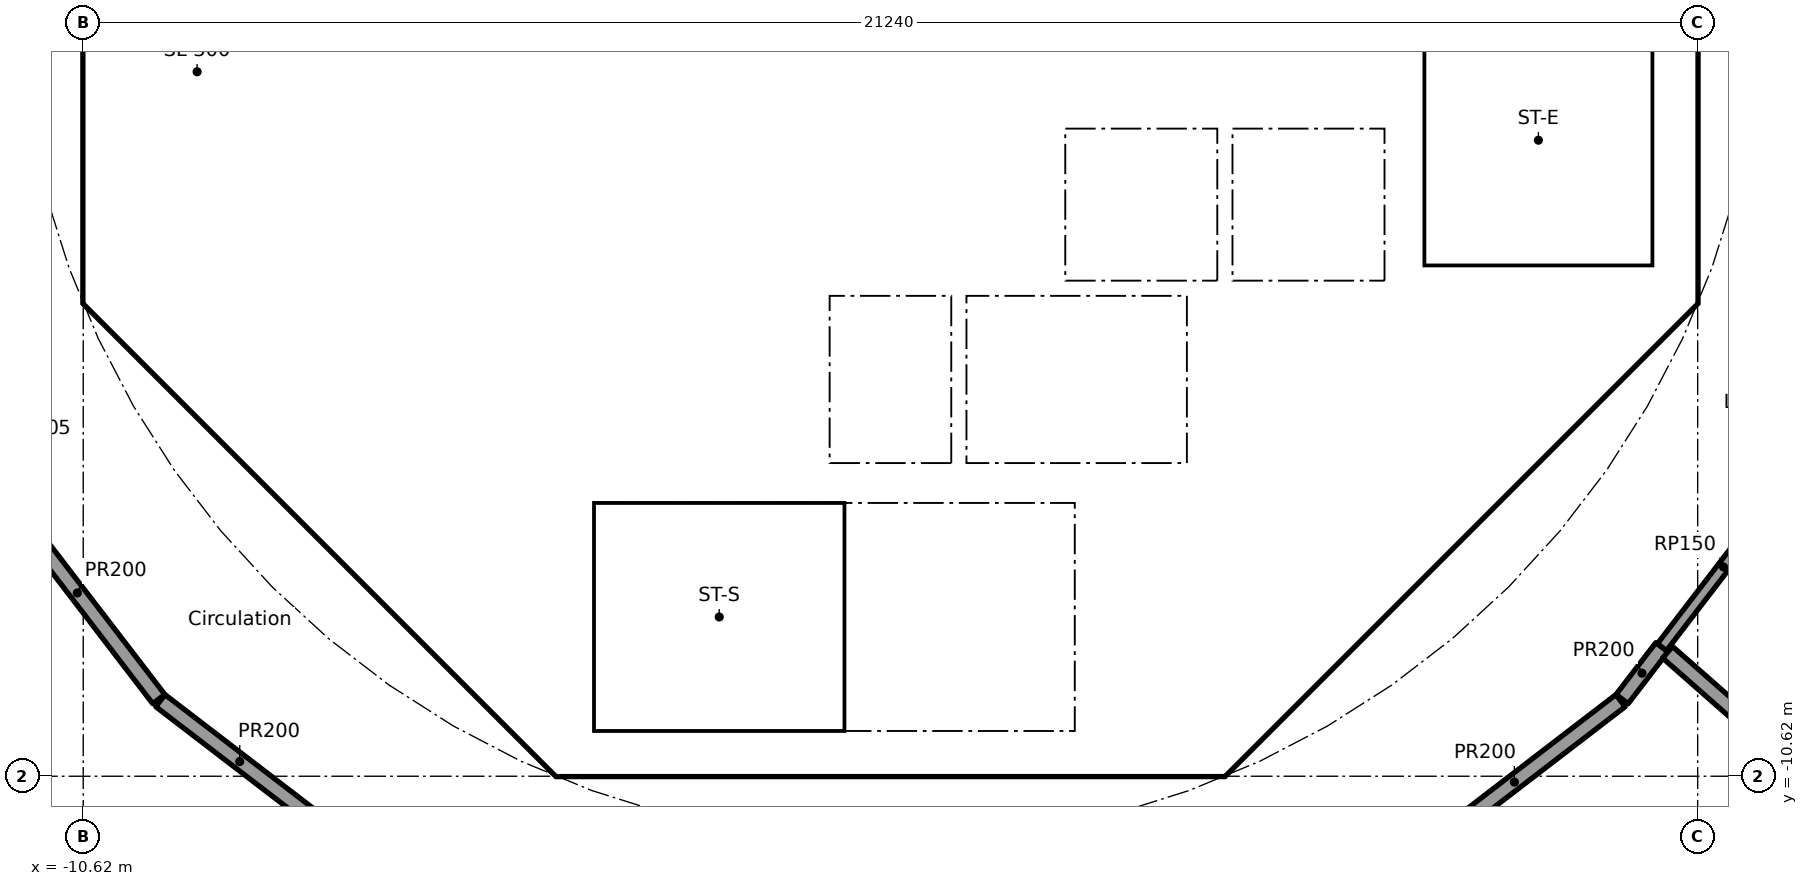
"""IFC4 building model, lengths in metres.
Left out: names, types, materials, properties, quantities, classifications, styles, units other than length and angle.
Written with IfcOpenShell. Run it as: python <this file> out.ifc"""

import sys

from ifc_helpers import new_model, si_unit, direction, frame, frame_2d, origin, place, context, subcontext, project, spatial, polyline, rectangle, outline, extrude, element, fill, save


model = new_model("IFC4")
c1 = context("Model", 3, precision=1e-05, world=origin(), true_north=direction((0.0, 1.0)))
c2 = subcontext(c1, "Body", "Model", "MODEL_VIEW")
j1 = project(units=[si_unit("LENGTHUNIT", "METRE"), si_unit("PLANEANGLEUNIT", "RADIAN")], contexts=[c1])
p1 = place(None, origin())
s1 = spatial("IfcSite", under=j1, at=p1, CompositionType="ELEMENT")
p2 = place(p1, origin())
s2 = spatial("IfcBuilding", under=s1, at=p2, CompositionType="ELEMENT")
p3 = place(p2, frame((0.0, 0.0, 324.9)))
s3 = spatial("IfcBuildingStorey", under=s2, at=p3, CompositionType="ELEMENT", Elevation=324.9)
p4 = place(p3, frame((-10.325, 3.801, 0.0), z_axis=(0.0, 0.0, 1.0), x_axis=(0.0, -1.0, 0.0)))
e1 = element("IfcWall", 1, at=p4, inside=s3, PredefinedType="SHEAR", context=c2, shape_type="SweptSolid", body=[
    extrude(rectangle(XDim=7.602, YDim=0.6, at=frame_2d((3.801, 0.0))), origin(), (0.0, 0.0, 1.0), 3.7),
])
p5 = place(p4, frame((0.651, 0.0, 0.0)))
e2 = element("IfcOpeningElement", 2, at=p5, cuts=e1, PredefinedType="OPENING", context=c2, shape_type="SweptSolid", body=[
    extrude(rectangle(XDim=1.5, YDim=2.1, at=frame_2d((0.75, 1.05))), frame((0.0, 0.31, 0.0), z_axis=(0.0, -1.0, 0.0), x_axis=(1.0, 0.0, 0.0)), (0.0, 0.0, 1.0), 0.62),
])
p6 = place(p4, frame((5.451, 0.0, 0.0)))
e3 = element("IfcOpeningElement", 3, at=p6, cuts=e1, PredefinedType="OPENING", context=c2, shape_type="SweptSolid", body=[
    extrude(rectangle(XDim=1.5, YDim=2.1, at=frame_2d((0.75, 1.05))), frame((0.0, 0.31, 0.0), z_axis=(0.0, -1.0, 0.0), x_axis=(1.0, 0.0, 0.0)), (0.0, 0.0, 1.0), 0.62),
])
p7 = place(p3, frame((-9.988, -4.613, 0.0), z_axis=(0.0, 0.0, 1.0), x_axis=(0.707106781187, -0.707106781187, 0.0)))
e4 = element("IfcWall", 4, at=p7, inside=s3, PredefinedType="SHEAR", context=c2, shape_type="SweptSolid", body=[
    extrude(rectangle(XDim=7.602, YDim=0.6, at=frame_2d((3.801, 0.0))), origin(), (0.0, 0.0, 1.0), 3.7),
])
p8 = place(p7, frame((6.151, 0.0, 0.0)))
e5 = element("IfcOpeningElement", 5, at=p8, cuts=e4, PredefinedType="OPENING", context=c2, shape_type="SweptSolid", body=[
    extrude(rectangle(XDim=1.1, YDim=2.1, at=frame_2d((0.55, 1.05))), frame((0.0, 0.31, 0.0), z_axis=(0.0, -1.0, 0.0), x_axis=(1.0, 0.0, 0.0)), (0.0, 0.0, 1.0), 0.62),
])
p9 = place(p3, frame((4.613, -9.988, 0.0), z_axis=(0.0, 0.0, 1.0), x_axis=(0.707106781187, 0.707106781187, 0.0)))
e6 = element("IfcWall", 6, at=p9, inside=s3, PredefinedType="SHEAR", context=c2, shape_type="SweptSolid", body=[
    extrude(rectangle(XDim=7.602, YDim=0.6, at=frame_2d((3.801, 0.0))), origin(), (0.0, 0.0, 1.0), 3.7),
])
p10 = place(p9, frame((3.201, 0.0, 0.0)))
e7 = element("IfcOpeningElement", 7, at=p10, cuts=e6, PredefinedType="OPENING", context=c2, shape_type="SweptSolid", body=[
    extrude(rectangle(XDim=1.2, YDim=2.1, at=frame_2d((0.6, 1.05))), frame((0.0, 0.31, 0.0), z_axis=(0.0, -1.0, 0.0), x_axis=(1.0, 0.0, 0.0)), (0.0, 0.0, 1.0), 0.62),
])
p11 = place(p3, frame((4.0, -10.025, 0.0), z_axis=(0.0, 0.0, 1.0), x_axis=(0.0, 1.0, 0.0)))
e8 = element("IfcWall", 8, at=p11, inside=s3, PredefinedType="SOLIDWALL", context=c2, shape_type="SweptSolid", body=[
    extrude(rectangle(XDim=3.0, YDim=0.2, at=frame_2d((1.5, 0.0))), origin(), (0.0, 0.0, 1.0), 3.7),
])
p12 = place(p11, frame((0.975, 0.0, 0.0)))
e9 = element("IfcOpeningElement", 9, at=p12, cuts=e8, PredefinedType="OPENING", context=c2, shape_type="SweptSolid", body=[
    extrude(rectangle(XDim=1.1, YDim=2.1, at=frame_2d((0.55, 1.05))), frame((0.0, 0.11, 0.0), z_axis=(0.0, -1.0, 0.0), x_axis=(1.0, 0.0, 0.0)), (0.0, 0.0, 1.0), 0.22),
])
p13 = place(p3, frame((-5.8, -8.227, 0.0), z_axis=(0.0, 0.0, 1.0), x_axis=(0.0, 1.0, 0.0)))
e10 = element("IfcWall", 10, at=p13, inside=s3, PredefinedType="PARTITIONING", context=c2, shape_type="SweptSolid", body=[
    extrude(rectangle(XDim=3.927, YDim=0.15, at=frame_2d((1.963, 0.0))), origin(), (0.0, 0.0, 1.0), 3.7),
])
p14 = place(p13, frame((2.764, 0.0, 0.0)))
e11 = element("IfcOpeningElement", 11, at=p14, cuts=e10, PredefinedType="OPENING", context=c2, shape_type="SweptSolid", body=[
    extrude(rectangle(XDim=0.9, YDim=2.1, at=frame_2d((0.45, 1.05))), frame((0.0, 0.085, 0.0), z_axis=(0.0, -1.0, 0.0), x_axis=(1.0, 0.0, 0.0)), (0.0, 0.0, 1.0), 0.17),
])
p15 = place(p13, frame((0.688, 0.0, 0.0)))
e12 = element("IfcOpeningElement", 12, at=p15, cuts=e10, PredefinedType="OPENING", context=c2, shape_type="SweptSolid", body=[
    extrude(rectangle(XDim=0.9, YDim=2.1, at=frame_2d((0.45, 1.05))), frame((0.0, 0.085, 0.0), z_axis=(0.0, -1.0, 0.0), x_axis=(1.0, 0.0, 0.0)), (0.0, 0.0, 1.0), 0.17),
])
p16 = place(p3, frame((4.0, -6.5, 0.0), z_axis=(0.0, 0.0, 1.0), x_axis=(0.0, 1.0, 0.0)))
e13 = element("IfcWall", 13, at=p16, inside=s3, PredefinedType="SOLIDWALL", context=c2, shape_type="SweptSolid", body=[
    extrude(rectangle(XDim=2.2, YDim=0.2, at=frame_2d((1.1, 0.0))), origin(), (0.0, 0.0, 1.0), 3.7),
])
p17 = place(p16, frame((0.55, 0.0, 0.0)))
e14 = element("IfcOpeningElement", 14, at=p17, cuts=e13, PredefinedType="OPENING", context=c2, shape_type="SweptSolid", body=[
    extrude(rectangle(XDim=1.1, YDim=2.1, at=frame_2d((0.55, 1.05))), frame((0.0, 0.11, 0.0), z_axis=(0.0, -1.0, 0.0), x_axis=(1.0, 0.0, 0.0)), (0.0, 0.0, 1.0), 0.22),
])
p18 = place(p3, frame((-4.0, -6.5, 0.0), z_axis=(0.0, 0.0, 1.0), x_axis=(0.0, 1.0, 0.0)))
e15 = element("IfcWall", 15, at=p18, inside=s3, PredefinedType="SOLIDWALL", context=c2, shape_type="SweptSolid", body=[
    extrude(rectangle(XDim=2.2, YDim=0.2, at=frame_2d((1.1, 0.0))), origin(), (0.0, 0.0, 1.0), 3.7),
])
p19 = place(p18, frame((0.65, 0.0, 0.0)))
e16 = element("IfcOpeningElement", 16, at=p19, cuts=e15, PredefinedType="OPENING", context=c2, shape_type="SweptSolid", body=[
    extrude(rectangle(XDim=0.9, YDim=2.1, at=frame_2d((0.45, 1.05))), frame((0.0, 0.11, 0.0), z_axis=(0.0, -1.0, 0.0), x_axis=(1.0, 0.0, 0.0)), (0.0, 0.0, 1.0), 0.22),
])
p20 = place(p3, frame((-6.7, -2.0, 0.0), z_axis=(0.0, 0.0, 1.0), x_axis=(1.0, 0.0, 0.0)))
e17 = element("IfcWall", 17, at=p20, inside=s3, PredefinedType="SOLIDWALL", context=c2, shape_type="SweptSolid", body=[
    extrude(rectangle(XDim=13.4, YDim=0.2, at=frame_2d((6.7, 0.0))), origin(), (0.0, 0.0, 1.0), 3.7),
])
p21 = place(p20, frame((1.85, 0.0, 0.0)))
e18 = element("IfcOpeningElement", 18, at=p21, cuts=e17, PredefinedType="OPENING", context=c2, shape_type="SweptSolid", body=[
    extrude(rectangle(XDim=0.9, YDim=2.1, at=frame_2d((0.45, 1.05))), frame((0.0, 0.11, 0.0), z_axis=(0.0, -1.0, 0.0), x_axis=(1.0, 0.0, 0.0)), (0.0, 0.0, 1.0), 0.22),
])
p22 = place(p20, frame((5.15, 0.0, 0.0)))
e19 = element("IfcOpeningElement", 19, at=p22, cuts=e17, PredefinedType="OPENING", context=c2, shape_type="SweptSolid", body=[
    extrude(rectangle(XDim=0.9, YDim=2.1, at=frame_2d((0.45, 1.05))), frame((0.0, 0.11, 0.0), z_axis=(0.0, -1.0, 0.0), x_axis=(1.0, 0.0, 0.0)), (0.0, 0.0, 1.0), 0.22),
])
p23 = place(p20, frame((7.35, 0.0, 0.0)))
e20 = element("IfcOpeningElement", 20, at=p23, cuts=e17, PredefinedType="OPENING", context=c2, shape_type="SweptSolid", body=[
    extrude(rectangle(XDim=0.9, YDim=2.1, at=frame_2d((0.45, 1.05))), frame((0.0, 0.11, 0.0), z_axis=(0.0, -1.0, 0.0), x_axis=(1.0, 0.0, 0.0)), (0.0, 0.0, 1.0), 0.22),
])
p24 = place(p3, origin())
e21 = element("IfcWall", 21, at=p24, inside=s3, PredefinedType="SHEAR", context=c2, shape_type="SweptSolid", body=[
    extrude(outline(polyline([(-10.625, -3.801), (-10.025, -3.801), (-10.025, -4.152), (-9.776, -4.401), (-10.2, -4.825), (-10.625, -4.401), (-10.625, -3.801)])), origin(), (0.0, 0.0, 1.0), 3.7),
])
p25 = place(p3, origin())
e22 = element("IfcWall", 22, at=p25, inside=s3, PredefinedType="SHEAR", context=c2, shape_type="SweptSolid", body=[
    extrude(outline(polyline([(-4.152, -10.025), (4.152, -10.025), (4.401, -9.776), (4.825, -10.2), (4.401, -10.625), (-4.401, -10.625), (-4.825, -10.2), (-4.401, -9.776), (-4.152, -10.025)])), origin(), (0.0, 0.0, 1.0), 3.7),
])
p26 = place(p3, origin())
e23 = element("IfcWall", 23, at=p26, inside=s3, PredefinedType="SHEAR", context=c2, shape_type="SweptSolid", body=[
    extrude(outline(polyline([(9.776, -4.401), (10.025, -4.152), (10.025, -3.801), (10.025, 4.152), (9.776, 4.401), (10.2, 4.825), (10.625, 4.401), (10.625, -4.401), (10.2, -4.825), (9.776, -4.401)])), origin(), (0.0, 0.0, 1.0), 3.7),
])
p27 = place(p3, frame((-10.025, -4.0, 0.0), z_axis=(0.0, 0.0, 1.0), x_axis=(1.0, 0.0, 0.0)))
e24 = element("IfcWall", 24, at=p27, inside=s3, PredefinedType="PARTITIONING", context=c2, shape_type="SweptSolid", body=[
    extrude(rectangle(XDim=3.325, YDim=0.2, at=frame_2d((1.662, 0.0))), origin(), (0.0, 0.0, 1.0), 3.7),
])
p28 = place(p3, frame((-8.301, -5.8, 0.0), z_axis=(0.0, 0.0, 1.0), x_axis=(1.0, 0.0, 0.0)))
e25 = element("IfcWall", 25, at=p28, inside=s3, PredefinedType="PARTITIONING", context=c2, shape_type="SweptSolid", body=[
    extrude(rectangle(XDim=2.426, YDim=0.15, at=frame_2d((1.213, 0.0))), origin(), (0.0, 0.0, 1.0), 3.7),
])
for number, where, z_axis, x_axis in (
    (26, (-0.9, -6.5, 0.0), (0.0, 0.0, 1.0), (0.0, 1.0, 0.0)),
    (27, (0.9, -6.5, 0.0), (0.0, 0.0, 1.0), (0.0, 1.0, 0.0)),
):
    element("IfcWall", number, at=place(p3, frame(where, z_axis=z_axis, x_axis=x_axis)), inside=s3, PredefinedType="SOLIDWALL", context=c2, shape_type="SweptSolid", body=[
        extrude(rectangle(XDim=2.2, YDim=0.2, at=frame_2d((1.1, 0.0))), origin(), (0.0, 0.0, 1.0), 3.7),
    ])
p29 = place(p3, origin())
e28 = element("IfcWall", 28, at=p29, inside=s3, PredefinedType="SOLIDWALL", context=c2, shape_type="SweptSolid", body=[
    extrude(outline(polyline([(-6.7, -2.1), (-6.5, -2.1), (-6.5, -4.1), (-2.3, -4.1), (-2.3, -2.1), (-2.1, -2.1), (-2.1, -4.1), (-0.1, -4.1), (-0.1, -2.1), (0.1, -2.1), (0.1, -4.1), (2.1, -4.1), (2.1, -2.1), (2.3, -2.1), (2.3, -4.1), (4.3, -4.1), (4.3, -2.1), (4.5, -2.1), (4.5, -4.1), (6.5, -4.1), (6.5, -2.1), (6.7, -2.1), (6.7, -4.3), (-6.7, -4.3), (-6.7, -2.1)])), origin(), (0.0, 0.0, 1.0), 3.7),
])
p30 = place(p3, origin())
e29 = element("IfcWall", 29, at=p30, inside=s3, PredefinedType="SOLIDWALL", context=c2, shape_type="SweptSolid", body=[
    extrude(outline(polyline([(-3.9, -10.025), (-4.1, -10.025), (-4.1, -7.025), (-3.9, -7.025), (-3.9, -10.025)])), origin(), (0.0, 0.0, 1.0), 3.7),
])
p31 = place(p3, origin())
e30 = element("IfcWall", 30, at=p31, inside=s3, PredefinedType="SOLIDWALL", context=c2, shape_type="SweptSolid", body=[
    extrude(outline(polyline([(4.1, -7.025), (-4.1, -7.025), (-4.1, -6.5), (4.1, -6.5), (4.1, -7.025)])), origin(), (0.0, 0.0, 1.0), 3.7),
])
p32 = place(p3, origin())
e31 = element("IfcWall", 31, at=p32, inside=s3, PredefinedType="SOLIDWALL", context=c2, shape_type="SweptSolid", body=[
    extrude(outline(polyline([(7.025, -3.9), (6.7, -3.9), (6.7, 3.9), (7.025, 3.9), (7.025, -3.9)])), origin(), (0.0, 0.0, 1.0), 3.7),
])
p33 = place(p3, origin())
e32 = element("IfcWall", 32, at=p33, inside=s3, PredefinedType="SOLIDWALL", context=c2, shape_type="SweptSolid", body=[
    extrude(outline(polyline([(10.025, -4.1), (6.7, -4.1), (6.7, -3.9), (10.025, -3.9), (10.025, -4.1)])), origin(), (0.0, 0.0, 1.0), 3.7),
])
p34 = place(p3, frame((11.771, -6.809, 0.0), z_axis=(0.0, 0.0, 1.0), x_axis=(-0.608731606531, -0.793376222993, 0.0)))
e33 = element("IfcWall", 33, at=p34, inside=s3, PredefinedType="PARTITIONING", context=c2, shape_type="SweptSolid", body=[
    extrude(rectangle(XDim=2.664, YDim=0.15, at=frame_2d((1.332, 0.0))), origin(), (0.0, 0.0, 1.0), 3.7),
])
p35 = place(p3, frame((-9.626, -9.605, 0.0), z_axis=(0.0, 0.0, 1.0), x_axis=(-0.608697977542, 0.793402024283, 0.0)))
e34 = element("IfcWall", 34, at=p35, inside=s3, PredefinedType="PARTITIONING", context=c2, shape_type="SweptSolid", body=[
    extrude(rectangle(XDim=3.52, YDim=0.2, at=frame_2d((1.76, 0.0))), origin(), (0.0, 0.0, 1.0), 3.7),
])
p36 = place(p3, frame((-7.517, -11.228, 0.0), z_axis=(0.0, 0.0, 1.0), x_axis=(-0.793395797287, 0.608706093979, 0.0)))
e35 = element("IfcWall", 35, at=p36, inside=s3, PredefinedType="PARTITIONING", context=c2, shape_type="SweptSolid", body=[
    extrude(rectangle(XDim=2.632, YDim=0.2, at=frame_2d((1.316, 0.0))), origin(), (0.0, 0.0, 1.0), 3.7),
])
p37 = place(p3, frame((9.605, -9.626, 0.0), z_axis=(0.0, 0.0, 1.0), x_axis=(-0.793402024283, -0.608697977542, 0.0)))
e36 = element("IfcWall", 36, at=p37, inside=s3, PredefinedType="PARTITIONING", context=c2, shape_type="SweptSolid", body=[
    extrude(rectangle(XDim=3.52, YDim=0.2, at=frame_2d((1.76, 0.0))), origin(), (0.0, 0.0, 1.0), 3.7),
])
p38 = place(p3, frame((10.149, -8.923, 0.0), z_axis=(0.0, 0.0, 1.0), x_axis=(-0.608694005511, -0.793405071609, 0.0)))
e37 = element("IfcWall", 37, at=p38, inside=s3, PredefinedType="PARTITIONING", context=c2, shape_type="SweptSolid", body=[
    extrude(rectangle(XDim=0.859, YDim=0.2, at=frame_2d((0.43, 0.0))), origin(), (0.0, 0.0, 1.0), 3.7),
])
p39 = place(p3, frame((13.301, -11.695, 0.0), z_axis=(0.0, 0.0, 1.0), x_axis=(-0.750994766266, 0.660308156122, 0.0)))
e38 = element("IfcWall", 38, at=p39, inside=s3, PredefinedType="PARTITIONING", context=c2, shape_type="SweptSolid", body=[
    extrude(rectangle(XDim=4.097, YDim=0.2, at=frame_2d((2.049, 0.0))), origin(), (0.0, 0.0, 1.0), 3.7),
])
p40 = place(p17, origin())
e39 = element("IfcDoor", 39, at=p40, inside=s3, OperationType="DOUBLE_DOOR_SLIDING", PredefinedType="DOOR", context=c2, shape_type="SweptSolid", body=[
    extrude(rectangle(XDim=1.1, YDim=2.1, at=frame_2d((0.55, 1.05))), frame((0.0, 0.025, 0.0), z_axis=(0.0, -1.0, 0.0), x_axis=(1.0, 0.0, 0.0)), (0.0, 0.0, 1.0), 0.05),
])
fill(e14, e39)
p41 = place(p12, origin())
e40 = element("IfcDoor", 40, at=p41, inside=s3, OperationType="SINGLE_SWING_LEFT", PredefinedType="DOOR", context=c2, shape_type="SweptSolid", body=[
    extrude(rectangle(XDim=1.1, YDim=2.1, at=frame_2d((0.55, 1.05))), frame((0.0, 0.025, 0.0), z_axis=(0.0, -1.0, 0.0), x_axis=(1.0, 0.0, 0.0)), (0.0, 0.0, 1.0), 0.05),
])
fill(e9, e40)
p42 = place(p14, origin())
e41 = element("IfcDoor", 41, at=p42, inside=s3, OperationType="SINGLE_SWING_LEFT", PredefinedType="DOOR", context=c2, shape_type="SweptSolid", body=[
    extrude(rectangle(XDim=0.9, YDim=2.1, at=frame_2d((0.45, 1.05))), frame((0.0, 0.025, 0.0), z_axis=(0.0, -1.0, 0.0), x_axis=(1.0, 0.0, 0.0)), (0.0, 0.0, 1.0), 0.05),
])
fill(e11, e41)
p43 = place(p15, origin())
e42 = element("IfcDoor", 42, at=p43, inside=s3, OperationType="SINGLE_SWING_LEFT", PredefinedType="DOOR", context=c2, shape_type="SweptSolid", body=[
    extrude(rectangle(XDim=0.9, YDim=2.1, at=frame_2d((0.45, 1.05))), frame((0.0, 0.025, 0.0), z_axis=(0.0, -1.0, 0.0), x_axis=(1.0, 0.0, 0.0)), (0.0, 0.0, 1.0), 0.05),
])
fill(e12, e42)
p44 = place(p19, frame((0.9, 0.0, 0.0), x_axis=(-1.0, 0.0, 0.0)))
e43 = element("IfcDoor", 43, at=p44, inside=s3, OperationType="SINGLE_SWING_LEFT", PredefinedType="DOOR", context=c2, shape_type="SweptSolid", body=[
    extrude(rectangle(XDim=0.9, YDim=2.1, at=frame_2d((0.45, 1.05))), frame((0.0, 0.025, 0.0), z_axis=(0.0, -1.0, 0.0), x_axis=(1.0, 0.0, 0.0)), (0.0, 0.0, 1.0), 0.05),
])
fill(e16, e43)
p45 = place(p21, frame((0.9, 0.0, 0.0), x_axis=(-1.0, 0.0, 0.0)))
e44 = element("IfcDoor", 44, at=p45, inside=s3, OperationType="SINGLE_SWING_LEFT", PredefinedType="DOOR", context=c2, shape_type="SweptSolid", body=[
    extrude(rectangle(XDim=0.9, YDim=2.1, at=frame_2d((0.45, 1.05))), frame((0.0, 0.025, 0.0), z_axis=(0.0, -1.0, 0.0), x_axis=(1.0, 0.0, 0.0)), (0.0, 0.0, 1.0), 0.05),
])
fill(e18, e44)
p46 = place(p22, frame((0.9, 0.0, 0.0), x_axis=(-1.0, 0.0, 0.0)))
e45 = element("IfcDoor", 45, at=p46, inside=s3, OperationType="SINGLE_SWING_LEFT", PredefinedType="DOOR", context=c2, shape_type="SweptSolid", body=[
    extrude(rectangle(XDim=0.9, YDim=2.1, at=frame_2d((0.45, 1.05))), frame((0.0, 0.025, 0.0), z_axis=(0.0, -1.0, 0.0), x_axis=(1.0, 0.0, 0.0)), (0.0, 0.0, 1.0), 0.05),
])
fill(e19, e45)
p47 = place(p23, frame((0.9, 0.0, 0.0), x_axis=(-1.0, 0.0, 0.0)))
e46 = element("IfcDoor", 46, at=p47, inside=s3, OperationType="SINGLE_SWING_LEFT", PredefinedType="DOOR", context=c2, shape_type="SweptSolid", body=[
    extrude(rectangle(XDim=0.9, YDim=2.1, at=frame_2d((0.45, 1.05))), frame((0.0, 0.025, 0.0), z_axis=(0.0, -1.0, 0.0), x_axis=(1.0, 0.0, 0.0)), (0.0, 0.0, 1.0), 0.05),
])
fill(e20, e46)
p48 = place(p10, origin())
e47 = element("IfcDoor", 47, at=p48, inside=s3, OperationType="SINGLE_SWING_LEFT", PredefinedType="DOOR", context=c2, shape_type="SweptSolid", body=[
    extrude(rectangle(XDim=1.2, YDim=2.1, at=frame_2d((0.6, 1.05))), frame((0.0, 0.025, 0.0), z_axis=(0.0, -1.0, 0.0), x_axis=(1.0, 0.0, 0.0)), (0.0, 0.0, 1.0), 0.05),
])
fill(e7, e47)
p49 = place(p6, origin())
e48 = element("IfcDoor", 48, at=p49, inside=s3, OperationType="DOUBLE_DOOR_SINGLE_SWING", PredefinedType="DOOR", context=c2, shape_type="SweptSolid", body=[
    extrude(rectangle(XDim=1.5, YDim=2.1, at=frame_2d((0.75, 1.05))), frame((0.0, 0.025, 0.0), z_axis=(0.0, -1.0, 0.0), x_axis=(1.0, 0.0, 0.0)), (0.0, 0.0, 1.0), 0.05),
])
fill(e3, e48)
p50 = place(p8, origin())
e49 = element("IfcDoor", 49, at=p50, inside=s3, OperationType="SINGLE_SWING_LEFT", PredefinedType="DOOR", context=c2, shape_type="SweptSolid", body=[
    extrude(rectangle(XDim=1.1, YDim=2.1, at=frame_2d((0.55, 1.05))), frame((0.0, 0.025, 0.0), z_axis=(0.0, -1.0, 0.0), x_axis=(1.0, 0.0, 0.0)), (0.0, 0.0, 1.0), 0.05),
])
fill(e5, e49)
save(model, sys.argv[1])
